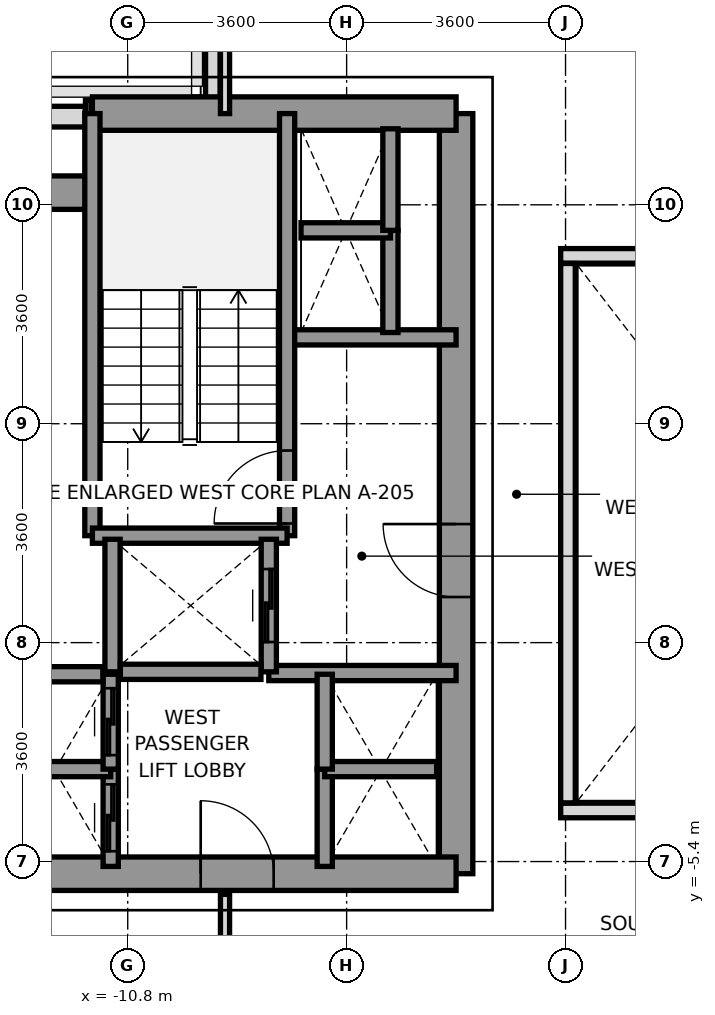
"""IFC4 building model, lengths in metres.
Left out: names, types, materials, properties, quantities, classifications, styles, units other than length and angle.
Written with IfcOpenShell. Run it as: python <this file> out.ifc"""

import sys

from ifc_helpers import new_model, si_unit, direction, frame, frame_2d, origin, place, context, subcontext, project, spatial, rectangle, extrude, source, transform, mapped, element, fill, save


model = new_model("IFC4")
c1 = context("Model", 3, precision=1e-05, world=origin(), true_north=direction((0.0, 1.0)))
c2 = subcontext(c1, "Body", "Model", "MODEL_VIEW")
j1 = project(units=[si_unit("LENGTHUNIT", "METRE"), si_unit("PLANEANGLEUNIT", "RADIAN")], contexts=[c1])
p1 = place(None, origin())
s1 = spatial("IfcSite", under=j1, at=p1, CompositionType="ELEMENT")
p2 = place(p1, origin())
s2 = spatial("IfcBuilding", under=s1, at=p2, CompositionType="ELEMENT")
p3 = place(p2, frame((0.0, 0.0, 64.6)))
s3 = spatial("IfcBuildingStorey", under=s2, at=p3, CompositionType="ELEMENT", Elevation=64.6)
p4 = place(p3, frame((-14.033, 6.85, 0.0), z_axis=(0.0, 0.0, 1.0), x_axis=(1.0, 0.0, 0.0)))
e1 = element("IfcWall", 1, at=p4, inside=s3, PredefinedType="SOLIDWALL", context=c2, shape_type="SweptSolid", body=[
    extrude(rectangle(XDim=2.535, YDim=0.34, at=frame_2d((1.268, 0.0))), origin(), (0.0, 0.0, 1.0), 3.2),
])
p5 = place(p3, frame((-11.495, 7.0, 0.0), z_axis=(0.0, 0.0, 1.0), x_axis=(1.0, 0.0, 0.0)))
e2 = element("IfcWall", 2, at=p5, inside=s3, PredefinedType="PARAPET", context=c2, shape_type="SweptSolid", body=[
    extrude(rectangle(XDim=0.092, YDim=0.24, at=frame_2d((0.046, 0.0))), origin(), (0.0, 0.0, 1.0), 1.15),
])
p6 = place(p3, frame((-9.4, 6.953, 0.0), z_axis=(0.0, 0.0, 1.0), x_axis=(0.0, 1.0, 0.0)))
e3 = element("IfcWall", 3, at=p6, inside=s3, PredefinedType="PARAPET", context=c2, shape_type="SweptSolid", body=[
    extrude(rectangle(XDim=1.444, YDim=0.24, at=frame_2d((0.722, 0.0))), origin(), (0.0, 0.0, 1.0), 1.15),
])
p7 = place(p3, frame((-5.4, -5.6, 0.0), z_axis=(0.0, 0.0, 1.0), x_axis=(0.0, 1.0, 0.0)))
e4 = element("IfcWall", 4, at=p7, inside=s3, PredefinedType="SHEAR", context=c2, shape_type="SweptSolid", body=[
    extrude(rectangle(XDim=12.5, YDim=0.55, at=frame_2d((6.25, 0.0))), origin(), (0.0, 0.0, 1.0), 3.2),
])
p8 = place(p7, frame((4.55, 0.0, 0.0)))
e5 = element("IfcOpeningElement", 5, at=p8, cuts=e4, PredefinedType="OPENING", context=c2, shape_type="SweptSolid", body=[
    extrude(rectangle(XDim=1.2, YDim=2.2, at=frame_2d((0.6, 1.1))), frame((0.0, 0.285, 0.0), z_axis=(0.0, -1.0, 0.0), x_axis=(1.0, 0.0, 0.0)), (0.0, 0.0, 1.0), 0.57),
])
p9 = place(p3, frame((-11.381, 6.9, 0.0), z_axis=(0.0, 0.0, 1.0), x_axis=(1.0, 0.0, 0.0)))
e6 = element("IfcWall", 6, at=p9, inside=s3, PredefinedType="SHEAR", context=c2, shape_type="SweptSolid", body=[
    extrude(rectangle(XDim=5.981, YDim=0.55, at=frame_2d((2.991, 0.0))), origin(), (0.0, 0.0, 1.0), 3.2),
])
p10 = place(p3, frame((-13.2, 5.6, 0.0), z_axis=(0.0, 0.0, 1.0), x_axis=(1.0, 0.0, 0.0)))
e7 = element("IfcWall", 7, at=p10, inside=s3, PredefinedType="SHEAR", context=c2, shape_type="SweptSolid", body=[
    extrude(rectangle(XDim=1.819, YDim=0.55, at=frame_2d((0.909, 0.0))), origin(), (0.0, 0.0, 1.0), 3.2),
])
p11 = place(p3, frame((-13.2, -5.6, 0.0), z_axis=(0.0, 0.0, 1.0), x_axis=(1.0, 0.0, 0.0)))
e8 = element("IfcWall", 8, at=p11, inside=s3, PredefinedType="SHEAR", context=c2, shape_type="SweptSolid", body=[
    extrude(rectangle(XDim=7.8, YDim=0.55, at=frame_2d((3.9, 0.0))), origin(), (0.0, 0.0, 1.0), 3.2),
])
p12 = place(p11, frame((3.6, 0.0, 0.0)))
e9 = element("IfcOpeningElement", 9, at=p12, cuts=e8, PredefinedType="OPENING", context=c2, shape_type="SweptSolid", body=[
    extrude(rectangle(XDim=1.2, YDim=2.2, at=frame_2d((0.6, 1.1))), frame((0.0, 0.285, 0.0), z_axis=(0.0, -1.0, 0.0), x_axis=(1.0, 0.0, 0.0)), (0.0, 0.0, 1.0), 0.57),
])
p13 = place(p3, frame((-8.18, 3.22, 0.0), z_axis=(0.0, 0.0, 1.0), x_axis=(1.0, 0.0, 0.0)))
e10 = element("IfcWall", 10, at=p13, inside=s3, PredefinedType="SOLIDWALL", context=c2, shape_type="SweptSolid", body=[
    extrude(rectangle(XDim=2.78, YDim=0.25, at=frame_2d((1.39, 0.0))), origin(), (0.0, 0.0, 1.0), 3.2),
])
p14 = place(p3, frame((-8.48, -2.3, 0.0), z_axis=(0.0, 0.0, 1.0), x_axis=(1.0, 0.0, 0.0)))
e11 = element("IfcWall", 11, at=p14, inside=s3, PredefinedType="SOLIDWALL", context=c2, shape_type="SweptSolid", body=[
    extrude(rectangle(XDim=3.08, YDim=0.25, at=frame_2d((1.54, 0.0))), origin(), (0.0, 0.0, 1.0), 3.2),
])
p15 = place(p3, frame((-8.179, -0.041, 0.0), z_axis=(0.0, 0.0, 1.0), x_axis=(0.0, 1.0, 0.0)))
e12 = element("IfcWall", 12, at=p15, inside=s3, PredefinedType="SOLIDWALL", context=c2, shape_type="SweptSolid", body=[
    extrude(rectangle(XDim=6.941, YDim=0.25, at=frame_2d((3.47, 0.0))), origin(), (0.0, 0.0, 1.0), 3.2),
])
p16 = place(p15, frame((0.2, 0.0, 0.0)))
e13 = element("IfcOpeningElement", 13, at=p16, cuts=e12, PredefinedType="OPENING", context=c2, shape_type="SweptSolid", body=[
    extrude(rectangle(XDim=1.2, YDim=2.2, at=frame_2d((0.6, 1.1))), frame((0.0, 0.135, 0.0), z_axis=(0.0, -1.0, 0.0), x_axis=(1.0, 0.0, 0.0)), (0.0, 0.0, 1.0), 0.27),
])
p17 = place(p3, frame((-11.381, -0.041, 0.0), z_axis=(0.0, 0.0, 1.0), x_axis=(0.0, 1.0, 0.0)))
e14 = element("IfcWall", 14, at=p17, inside=s3, PredefinedType="SOLIDWALL", context=c2, shape_type="SweptSolid", body=[
    extrude(rectangle(XDim=6.941, YDim=0.25, at=frame_2d((3.47, 0.0))), origin(), (0.0, 0.0, 1.0), 3.2),
])
p18 = place(p3, frame((-11.381, -0.041, 0.0), z_axis=(0.0, 0.0, 1.0), x_axis=(1.0, 0.0, 0.0)))
e15 = element("IfcWall", 15, at=p18, inside=s3, PredefinedType="SOLIDWALL", context=c2, shape_type="SweptSolid", body=[
    extrude(rectangle(XDim=3.202, YDim=0.25, at=frame_2d((1.601, 0.0))), origin(), (0.0, 0.0, 1.0), 3.2),
])
p19 = place(p3, frame((-11.05, -2.28, 0.0), z_axis=(0.0, 0.0, 1.0), x_axis=(0.0, 1.0, 0.0)))
e16 = element("IfcWall", 16, at=p19, inside=s3, PredefinedType="SOLIDWALL", context=c2, shape_type="SweptSolid", body=[
    extrude(rectangle(XDim=2.18, YDim=0.25, at=frame_2d((1.09, 0.0))), origin(), (0.0, 0.0, 1.0), 3.2),
])
p20 = place(p3, frame((-8.48, -2.28, 0.0), z_axis=(0.0, 0.0, 1.0), x_axis=(0.0, 1.0, 0.0)))
e17 = element("IfcWall", 17, at=p20, inside=s3, PredefinedType="SOLIDWALL", context=c2, shape_type="SweptSolid", body=[
    extrude(rectangle(XDim=2.18, YDim=0.25, at=frame_2d((1.09, 0.0))), origin(), (0.0, 0.0, 1.0), 3.2),
])
p21 = place(p20, frame((0.49, 0.0, 0.0)))
e18 = element("IfcOpeningElement", 18, at=p21, cuts=e17, PredefinedType="OPENING", context=c2, shape_type="SweptSolid", body=[
    extrude(rectangle(XDim=1.2, YDim=2.2, at=frame_2d((0.6, 1.1))), frame((0.0, 0.135, 0.0), z_axis=(0.0, -1.0, 0.0), x_axis=(1.0, 0.0, 0.0)), (0.0, 0.0, 1.0), 0.27),
])
p22 = place(p3, frame((-10.921, -2.28, 0.0), z_axis=(0.0, 0.0, 1.0), x_axis=(1.0, 0.0, 0.0)))
e19 = element("IfcWall", 19, at=p22, inside=s3, PredefinedType="SOLIDWALL", context=c2, shape_type="SweptSolid", body=[
    extrude(rectangle(XDim=2.312, YDim=0.25, at=frame_2d((1.156, 0.0))), origin(), (0.0, 0.0, 1.0), 3.2),
])
p23 = place(p3, frame((-11.08, -5.48, 0.0), z_axis=(0.0, 0.0, 1.0), x_axis=(0.0, 1.0, 0.0)))
e20 = element("IfcWall", 20, at=p23, inside=s3, PredefinedType="SOLIDWALL", context=c2, shape_type="SweptSolid", body=[
    extrude(rectangle(XDim=1.6, YDim=0.25, at=frame_2d((0.8, 0.0))), origin(), (0.0, 0.0, 1.0), 3.2),
])
p24 = place(p23, frame((0.25, 0.0, 0.0)))
e21 = element("IfcOpeningElement", 21, at=p24, cuts=e20, PredefinedType="OPENING", context=c2, shape_type="SweptSolid", body=[
    extrude(rectangle(XDim=1.1, YDim=2.2, at=frame_2d((0.55, 1.1))), frame((0.0, 0.135, 0.0), z_axis=(0.0, -1.0, 0.0), x_axis=(1.0, 0.0, 0.0)), (0.0, 0.0, 1.0), 0.27),
])
p25 = place(p3, frame((-12.92, -3.88, 0.0), z_axis=(0.0, 0.0, 1.0), x_axis=(1.0, 0.0, 0.0)))
e22 = element("IfcWall", 22, at=p25, inside=s3, PredefinedType="SOLIDWALL", context=c2, shape_type="SweptSolid", body=[
    extrude(rectangle(XDim=1.84, YDim=0.25, at=frame_2d((0.92, 0.0))), origin(), (0.0, 0.0, 1.0), 3.2),
])
p26 = place(p3, frame((-11.08, -3.88, 0.0), z_axis=(0.0, 0.0, 1.0), x_axis=(0.0, 1.0, 0.0)))
e23 = element("IfcWall", 23, at=p26, inside=s3, PredefinedType="SOLIDWALL", context=c2, shape_type="SweptSolid", body=[
    extrude(rectangle(XDim=1.56, YDim=0.25, at=frame_2d((0.78, 0.0))), origin(), (0.0, 0.0, 1.0), 3.2),
])
p27 = place(p26, frame((0.23, 0.0, 0.0)))
e24 = element("IfcOpeningElement", 24, at=p27, cuts=e23, PredefinedType="OPENING", context=c2, shape_type="SweptSolid", body=[
    extrude(rectangle(XDim=1.1, YDim=2.2, at=frame_2d((0.55, 1.1))), frame((0.0, 0.135, 0.0), z_axis=(0.0, -1.0, 0.0), x_axis=(1.0, 0.0, 0.0)), (0.0, 0.0, 1.0), 0.27),
])
p28 = place(p3, frame((-12.791, -2.32, 0.0), z_axis=(0.0, 0.0, 1.0), x_axis=(1.0, 0.0, 0.0)))
e25 = element("IfcWall", 25, at=p28, inside=s3, PredefinedType="SOLIDWALL", context=c2, shape_type="SweptSolid", body=[
    extrude(rectangle(XDim=1.582, YDim=0.25, at=frame_2d((0.791, 0.0))), origin(), (0.0, 0.0, 1.0), 3.2),
])
p29 = place(p3, frame((-7.56, -5.48, 0.0), z_axis=(0.0, 0.0, 1.0), x_axis=(0.0, 1.0, 0.0)))
e26 = element("IfcWall", 26, at=p29, inside=s3, PredefinedType="SOLIDWALL", context=c2, shape_type="SweptSolid", body=[
    extrude(rectangle(XDim=1.6, YDim=0.25, at=frame_2d((0.8, 0.0))), origin(), (0.0, 0.0, 1.0), 3.2),
])
p30 = place(p3, frame((-7.56, -3.88, 0.0), z_axis=(0.0, 0.0, 1.0), x_axis=(1.0, 0.0, 0.0)))
e27 = element("IfcWall", 27, at=p30, inside=s3, PredefinedType="SOLIDWALL", context=c2, shape_type="SweptSolid", body=[
    extrude(rectangle(XDim=1.84, YDim=0.25, at=frame_2d((0.92, 0.0))), origin(), (0.0, 0.0, 1.0), 3.2),
])
p31 = place(p3, frame((-7.56, -3.88, 0.0), z_axis=(0.0, 0.0, 1.0), x_axis=(0.0, 1.0, 0.0)))
e28 = element("IfcWall", 28, at=p31, inside=s3, PredefinedType="SOLIDWALL", context=c2, shape_type="SweptSolid", body=[
    extrude(rectangle(XDim=1.56, YDim=0.25, at=frame_2d((0.78, 0.0))), origin(), (0.0, 0.0, 1.0), 3.2),
])
p32 = place(p3, frame((-6.48, 3.3, 0.0), z_axis=(0.0, 0.0, 1.0), x_axis=(0.0, 1.0, 0.0)))
e29 = element("IfcWall", 29, at=p32, inside=s3, PredefinedType="SOLIDWALL", context=c2, shape_type="SweptSolid", body=[
    extrude(rectangle(XDim=1.68, YDim=0.25, at=frame_2d((0.84, 0.0))), origin(), (0.0, 0.0, 1.0), 3.2),
])
p33 = place(p3, frame((-7.95, 4.98, 0.0), z_axis=(0.0, 0.0, 1.0), x_axis=(1.0, 0.0, 0.0)))
e30 = element("IfcWall", 30, at=p33, inside=s3, PredefinedType="SOLIDWALL", context=c2, shape_type="SweptSolid", body=[
    extrude(rectangle(XDim=1.47, YDim=0.25, at=frame_2d((0.735, 0.0))), origin(), (0.0, 0.0, 1.0), 3.2),
])
p34 = place(p3, frame((-6.48, 4.98, 0.0), z_axis=(0.0, 0.0, 1.0), x_axis=(0.0, 1.0, 0.0)))
e31 = element("IfcWall", 31, at=p34, inside=s3, PredefinedType="SOLIDWALL", context=c2, shape_type="SweptSolid", body=[
    extrude(rectangle(XDim=1.67, YDim=0.25, at=frame_2d((0.835, 0.0))), origin(), (0.0, 0.0, 1.0), 3.2),
])
p35 = place(p3, frame((-9.2, 6.9, 0.0), z_axis=(0.0, 0.0, 1.0), x_axis=(0.0, 1.0, 0.0)))
e32 = element("IfcWall", 32, at=p35, inside=s3, PredefinedType="PARTITIONING", context=c2, shape_type="SweptSolid", body=[
    extrude(rectangle(XDim=8.78, YDim=0.15, at=frame_2d((4.39, 0.0))), origin(), (0.0, 0.0, 1.0), 2.65),
])
p36 = place(p3, frame((-9.2, -15.68, 0.0), z_axis=(0.0, 0.0, 1.0), x_axis=(0.0, 1.0, 0.0)))
e33 = element("IfcWall", 33, at=p36, inside=s3, PredefinedType="PARTITIONING", context=c2, shape_type="SweptSolid", body=[
    extrude(rectangle(XDim=9.74, YDim=0.15, at=frame_2d((4.87, 0.0))), origin(), (0.0, 0.0, 1.0), 2.65),
])
for number, where, z_axis, x_axis in (
    (34, (-3.68, -4.56, 0.0), (0.0, 0.0, 1.0), (1.0, 0.0, 0.0)),
    (35, (-3.68, 4.56, 0.0), (0.0, 0.0, 1.0), (1.0, 0.0, 0.0)),
):
    element("IfcWall", number, at=place(p3, frame(where, z_axis=z_axis, x_axis=x_axis)), inside=s3, PredefinedType="PARAPET", context=c2, shape_type="SweptSolid", body=[
        extrude(rectangle(XDim=7.36, YDim=0.24, at=frame_2d((3.68, 0.0))), origin(), (0.0, 0.0, 1.0), 1.15),
    ])
p37 = place(p3, frame((-3.56, -4.435, 0.0), z_axis=(0.0, 0.0, 1.0), x_axis=(0.0, 1.0, 0.0)))
e36 = element("IfcWall", 36, at=p37, inside=s3, PredefinedType="PARAPET", context=c2, shape_type="SweptSolid", body=[
    extrude(rectangle(XDim=8.87, YDim=0.24, at=frame_2d((4.435, 0.0))), origin(), (0.0, 0.0, 1.0), 1.15),
])
m1 = source(origin(), c2, "Body", "SweptSolid", [
    extrude(rectangle(XDim=1.2, YDim=2.2, at=frame_2d((0.6, 1.1))), frame((0.0, 0.025, 0.0), z_axis=(0.0, -1.0, 0.0), x_axis=(1.0, 0.0, 0.0)), (0.0, 0.0, 1.0), 0.05),
])
p38 = place(p16, origin())
e37 = element("IfcDoor", 37, at=p38, inside=s3, OperationType="SINGLE_SWING_LEFT", PredefinedType="DOOR", context=c2, shape_type="MappedRepresentation", body=[
    mapped(m1, transform((0.0, 0.0, 0.0), x_axis=(1.0, 0.0, 0.0), y_axis=(0.0, 1.0, 0.0), z_axis=(0.0, 0.0, 1.0), scale=1.0)),
])
fill(e13, e37)
p39 = place(p8, origin())
e38 = element("IfcDoor", 38, at=p39, inside=s3, OperationType="SINGLE_SWING_RIGHT", PredefinedType="DOOR", context=c2, shape_type="MappedRepresentation", body=[
    mapped(m1, transform((0.0, 0.0, 0.0), x_axis=(1.0, 0.0, 0.0), y_axis=(0.0, 1.0, 0.0), z_axis=(0.0, 0.0, 1.0), scale=1.0)),
])
fill(e5, e38)
p40 = place(p12, origin())
e39 = element("IfcDoor", 39, at=p40, inside=s3, OperationType="SINGLE_SWING_LEFT", PredefinedType="DOOR", context=c2, shape_type="MappedRepresentation", body=[
    mapped(m1, transform((0.0, 0.0, 0.0), x_axis=(1.0, 0.0, 0.0), y_axis=(0.0, 1.0, 0.0), z_axis=(0.0, 0.0, 1.0), scale=1.0)),
])
fill(e9, e39)
p41 = place(p21, origin())
e40 = element("IfcDoor", 40, at=p41, inside=s3, OperationType="SLIDING_TO_RIGHT", PredefinedType="DOOR", context=c2, shape_type="MappedRepresentation", body=[
    mapped(m1, transform((0.0, 0.0, 0.0), x_axis=(1.0, 0.0, 0.0), y_axis=(0.0, 1.0, 0.0), z_axis=(0.0, 0.0, 1.0), scale=1.0)),
])
fill(e18, e40)
m2 = source(origin(), c2, "Body", "SweptSolid", [
    extrude(rectangle(XDim=1.1, YDim=2.2, at=frame_2d((0.55, 1.1))), frame((0.0, 0.025, 0.0), z_axis=(0.0, -1.0, 0.0), x_axis=(1.0, 0.0, 0.0)), (0.0, 0.0, 1.0), 0.05),
])
p42 = place(p24, origin())
e41 = element("IfcDoor", 41, at=p42, inside=s3, OperationType="SLIDING_TO_LEFT", PredefinedType="DOOR", context=c2, shape_type="MappedRepresentation", body=[
    mapped(m2, transform((0.0, 0.0, 0.0), x_axis=(1.0, 0.0, 0.0), y_axis=(0.0, 1.0, 0.0), z_axis=(0.0, 0.0, 1.0), scale=1.0)),
])
fill(e21, e41)
p43 = place(p27, origin())
e42 = element("IfcDoor", 42, at=p43, inside=s3, OperationType="SLIDING_TO_LEFT", PredefinedType="DOOR", context=c2, shape_type="MappedRepresentation", body=[
    mapped(m2, transform((0.0, 0.0, 0.0), x_axis=(1.0, 0.0, 0.0), y_axis=(0.0, 1.0, 0.0), z_axis=(0.0, 0.0, 1.0), scale=1.0)),
])
fill(e24, e42)
save(model, sys.argv[1])
